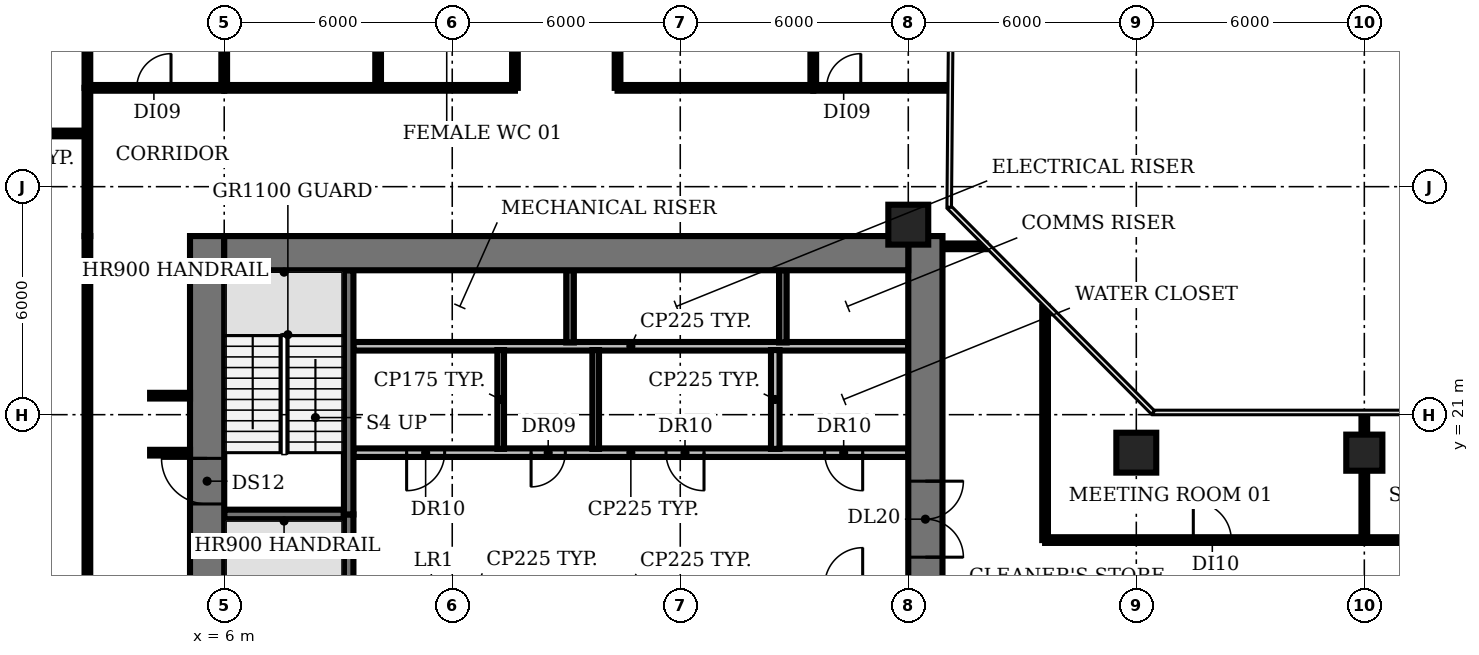
"""IFC4 building model, lengths in metres.
Left out: names, types, materials, properties, quantities, classifications, styles, units other than length and angle.
Written with IfcOpenShell. Run it as: python <this file> out.ifc"""

import sys

from ifc_helpers import new_model, si_unit, direction, frame, frame_2d, origin, origin_2d, place, context, subcontext, project, spatial, rectangle, circle, extrude, element, fill, save


model = new_model("IFC4")
c1 = context("Model", 3, precision=1e-05, world=origin(), true_north=direction((0.0, 1.0)))
c2 = subcontext(c1, "Body", "Model", "MODEL_VIEW")
j1 = project(units=[si_unit("LENGTHUNIT", "METRE"), si_unit("PLANEANGLEUNIT", "RADIAN")], contexts=[c1])
p1 = place(None, origin())
s1 = spatial("IfcSite", under=j1, at=p1, CompositionType="ELEMENT")
p2 = place(p1, origin())
s2 = spatial("IfcBuilding", under=s1, at=p2, CompositionType="ELEMENT")
p3 = place(p2, frame((0.0, 0.0, 50.0)))
s3 = spatial("IfcBuildingStorey", under=s2, at=p3, CompositionType="ELEMENT", Elevation=50.0)
for number, where, z_axis, x_axis in (
    (1, (24.0, 26.0, 0.0), (0.0, 0.0, 1.0), (1.0, 0.0, 0.0)),
    (2, (30.0, 20.0, 0.0), (0.0, 0.0, 1.0), (1.0, 0.0, 0.0)),
):
    element("IfcColumn", number, at=place(p3, frame(where, z_axis=z_axis, x_axis=x_axis)), inside=s3, PredefinedType="COLUMN", context=c2, shape_type="SweptSolid", body=[
        extrude(circle(Radius=0.525, at=origin_2d()), origin(), (0.0, 0.0, 1.0), 3.85),
    ])
p4 = place(p3, frame((36.0, 20.0, 0.0), z_axis=(0.0, 0.0, 1.0), x_axis=(1.0, 0.0, 0.0)))
e3 = element("IfcColumn", 3, at=p4, inside=s3, PredefinedType="COLUMN", context=c2, shape_type="SweptSolid", body=[
    extrude(rectangle(XDim=0.95, YDim=0.95, at=origin_2d()), origin(), (0.0, 0.0, 1.0), 3.85),
])
p5 = place(p3, frame((6.0, 18.375, 0.0), z_axis=(0.0, 0.0, 1.0), x_axis=(1.0, 0.0, 0.0)))
e4 = element("IfcWall", 4, at=p5, inside=s3, PredefinedType="SHEAR", context=c2, shape_type="SweptSolid", body=[
    extrude(rectangle(XDim=3.15, YDim=0.25, at=frame_2d((1.575, 0.0))), origin(), (0.0, 0.0, 1.0), 3.85),
])
p6 = place(p3, frame((24.0, 20.0, 0.0), z_axis=(0.0, 0.0, 1.0), x_axis=(-1.0, 0.0, 0.0)))
e5 = element("IfcWall", 5, at=p6, inside=s3, PredefinedType="PARTITIONING", context=c2, shape_type="SweptSolid", body=[
    extrude(rectangle(XDim=14.6, YDim=0.225, at=frame_2d((7.3, 0.0))), origin(), (0.0, 0.0, 1.0), 3.85),
])
p7 = place(p6, frame((12.2, 0.0, 0.0)))
e6 = element("IfcOpeningElement", 6, at=p7, cuts=e5, PredefinedType="OPENING", context=c2, shape_type="SweptSolid", body=[
    extrude(rectangle(XDim=1.0, YDim=2.1, at=frame_2d((0.5, 1.05))), frame((0.0, 0.123, 0.0), z_axis=(0.0, -1.0, 0.0), x_axis=(1.0, 0.0, 0.0)), (0.0, 0.0, 1.0), 0.245),
])
p8 = place(p6, frame((9.025, 0.0, 0.0)))
e7 = element("IfcOpeningElement", 7, at=p8, cuts=e5, PredefinedType="OPENING", context=c2, shape_type="SweptSolid", body=[
    extrude(rectangle(XDim=0.9, YDim=2.1, at=frame_2d((0.45, 1.05))), frame((0.0, 0.123, 0.0), z_axis=(0.0, -1.0, 0.0), x_axis=(1.0, 0.0, 0.0)), (0.0, 0.0, 1.0), 0.245),
])
p9 = place(p6, frame((5.375, 0.0, 0.0)))
e8 = element("IfcOpeningElement", 8, at=p9, cuts=e5, PredefinedType="OPENING", context=c2, shape_type="SweptSolid", body=[
    extrude(rectangle(XDim=1.0, YDim=2.1, at=frame_2d((0.5, 1.05))), frame((0.0, 0.123, 0.0), z_axis=(0.0, -1.0, 0.0), x_axis=(1.0, 0.0, 0.0)), (0.0, 0.0, 1.0), 0.245),
])
p10 = place(p6, frame((1.2, 0.0, 0.0)))
e9 = element("IfcOpeningElement", 9, at=p10, cuts=e5, PredefinedType="OPENING", context=c2, shape_type="SweptSolid", body=[
    extrude(rectangle(XDim=1.0, YDim=2.1, at=frame_2d((0.5, 1.05))), frame((0.0, 0.123, 0.0), z_axis=(0.0, -1.0, 0.0), x_axis=(1.0, 0.0, 0.0)), (0.0, 0.0, 1.0), 0.245),
])
p11 = place(p3, frame((9.4, 22.8, 0.0), z_axis=(0.0, 0.0, 1.0), x_axis=(1.0, 0.0, 0.0)))
e10 = element("IfcWall", 10, at=p11, inside=s3, PredefinedType="PARTITIONING", context=c2, shape_type="SweptSolid", body=[
    extrude(rectangle(XDim=14.6, YDim=0.225, at=frame_2d((7.3, 0.0))), origin(), (0.0, 0.0, 1.0), 3.85),
])
p12 = place(p3, frame((9.275, 18.375, 0.0), z_axis=(0.0, 0.0, 1.0), x_axis=(0.0, -1.0, 0.0)))
e11 = element("IfcWall", 11, at=p12, inside=s3, PredefinedType="SHEAR", context=c2, shape_type="SweptSolid", body=[
    extrude(rectangle(XDim=6.55, YDim=0.25, at=frame_2d((3.275, 0.0))), origin(), (0.0, 0.0, 1.0), 3.85),
])
p13 = place(p12, frame((5.075, 0.0, 0.0)))
e12 = element("IfcOpeningElement", 12, at=p13, cuts=e11, PredefinedType="OPENING", context=c2, shape_type="SweptSolid", body=[
    extrude(rectangle(XDim=1.0, YDim=2.1, at=frame_2d((0.5, 1.05))), frame((0.0, 0.135, 0.0), z_axis=(0.0, -1.0, 0.0), x_axis=(1.0, 0.0, 0.0)), (0.0, 0.0, 1.0), 0.27),
])
p14 = place(p3, frame((9.275, 18.375, 0.0), z_axis=(0.0, 0.0, 1.0), x_axis=(0.0, 1.0, 0.0)))
e13 = element("IfcWall", 13, at=p14, inside=s3, PredefinedType="SHEAR", context=c2, shape_type="SweptSolid", body=[
    extrude(rectangle(XDim=6.425, YDim=0.25, at=frame_2d((3.212, 0.0))), origin(), (0.0, 0.0, 1.0), 3.85),
])
p15 = place(p3, frame((13.275, 20.1, 0.0), z_axis=(0.0, 0.0, 1.0), x_axis=(0.0, 1.0, 0.0)))
e14 = element("IfcWall", 14, at=p15, inside=s3, PredefinedType="PARTITIONING", context=c2, shape_type="SweptSolid", body=[
    extrude(rectangle(XDim=2.6, YDim=0.175, at=frame_2d((1.3, 0.0))), origin(), (0.0, 0.0, 1.0), 3.85),
])
p16 = place(p3, frame((15.1, 22.9, 0.0), z_axis=(0.0, 0.0, 1.0), x_axis=(0.0, 1.0, 0.0)))
e15 = element("IfcWall", 15, at=p16, inside=s3, PredefinedType="SHEAR", context=c2, shape_type="SweptSolid", body=[
    extrude(rectangle(XDim=1.9, YDim=0.2, at=frame_2d((0.95, 0.0))), origin(), (0.0, 0.0, 1.0), 3.85),
])
p17 = place(p3, frame((15.775, 20.1, 0.0), z_axis=(0.0, 0.0, 1.0), x_axis=(0.0, 1.0, 0.0)))
e16 = element("IfcWall", 16, at=p17, inside=s3, PredefinedType="PARTITIONING", context=c2, shape_type="SweptSolid", body=[
    extrude(rectangle(XDim=2.6, YDim=0.175, at=frame_2d((1.3, 0.0))), origin(), (0.0, 0.0, 1.0), 3.85),
])
p18 = place(p3, frame((20.5, 20.1, 0.0), z_axis=(0.0, 0.0, 1.0), x_axis=(0.0, 1.0, 0.0)))
e17 = element("IfcWall", 17, at=p18, inside=s3, PredefinedType="PARTITIONING", context=c2, shape_type="SweptSolid", body=[
    extrude(rectangle(XDim=2.6, YDim=0.225, at=frame_2d((1.3, 0.0))), origin(), (0.0, 0.0, 1.0), 3.85),
])
p19 = place(p3, frame((20.7, 22.9, 0.0), z_axis=(0.0, 0.0, 1.0), x_axis=(0.0, 1.0, 0.0)))
e18 = element("IfcWall", 18, at=p19, inside=s3, PredefinedType="SHEAR", context=c2, shape_type="SweptSolid", body=[
    extrude(rectangle(XDim=1.9, YDim=0.2, at=frame_2d((0.95, 0.0))), origin(), (0.0, 0.0, 1.0), 3.85),
])
p20 = place(p3, frame((5.55, 4.5, 0.0), z_axis=(0.0, 0.0, 1.0), x_axis=(0.0, 1.0, 0.0)))
e19 = element("IfcWall", 19, at=p20, inside=s3, PredefinedType="SHEAR", context=c2, shape_type="SweptSolid", body=[
    extrude(rectangle(XDim=21.2, YDim=0.9, at=frame_2d((10.6, 0.0))), origin(), (0.0, 0.0, 1.0), 3.85),
])
p21 = place(p20, frame((1.15, 0.0, 0.0)))
e20 = element("IfcOpeningElement", 20, at=p21, cuts=e19, PredefinedType="OPENING", context=c2, shape_type="SweptSolid", body=[
    extrude(rectangle(XDim=1.5, YDim=2.1, at=frame_2d((0.75, 1.05))), frame((0.0, 0.46, 0.0), z_axis=(0.0, -1.0, 0.0), x_axis=(1.0, 0.0, 0.0)), (0.0, 0.0, 1.0), 0.92),
])
p22 = place(p20, frame((7.6, 0.0, 0.0)))
e21 = element("IfcOpeningElement", 21, at=p22, cuts=e19, PredefinedType="OPENING", context=c2, shape_type="SweptSolid", body=[
    extrude(rectangle(XDim=1.2, YDim=2.1, at=frame_2d((0.6, 1.05))), frame((0.0, 0.46, 0.0), z_axis=(0.0, -1.0, 0.0), x_axis=(1.0, 0.0, 0.0)), (0.0, 0.0, 1.0), 0.92),
])
p23 = place(p20, frame((14.15, 0.0, 0.0)))
e22 = element("IfcOpeningElement", 22, at=p23, cuts=e19, PredefinedType="OPENING", context=c2, shape_type="SweptSolid", body=[
    extrude(rectangle(XDim=1.2, YDim=2.1, at=frame_2d((0.6, 1.05))), frame((0.0, 0.46, 0.0), z_axis=(0.0, -1.0, 0.0), x_axis=(1.0, 0.0, 0.0)), (0.0, 0.0, 1.0), 0.92),
])
p24 = place(p3, frame((24.45, 25.7, 0.0), z_axis=(0.0, 0.0, 1.0), x_axis=(0.0, -1.0, 0.0)))
e23 = element("IfcWall", 23, at=p24, inside=s3, PredefinedType="SHEAR", context=c2, shape_type="SweptSolid", body=[
    extrude(rectangle(XDim=21.2, YDim=0.9, at=frame_2d((10.6, 0.0))), origin(), (0.0, 0.0, 1.0), 3.85),
])
p25 = place(p24, frame((18.55, 0.0, 0.0)))
e24 = element("IfcOpeningElement", 24, at=p25, cuts=e23, PredefinedType="OPENING", context=c2, shape_type="SweptSolid", body=[
    extrude(rectangle(XDim=1.5, YDim=2.1, at=frame_2d((0.75, 1.05))), frame((0.0, 0.46, 0.0), z_axis=(0.0, -1.0, 0.0), x_axis=(1.0, 0.0, 0.0)), (0.0, 0.0, 1.0), 0.92),
])
p26 = place(p24, frame((12.45, 0.0, 0.0)))
e25 = element("IfcOpeningElement", 25, at=p26, cuts=e23, PredefinedType="OPENING", context=c2, shape_type="SweptSolid", body=[
    extrude(rectangle(XDim=0.9, YDim=2.1, at=frame_2d((0.45, 1.05))), frame((0.0, 0.46, 0.0), z_axis=(0.0, -1.0, 0.0), x_axis=(1.0, 0.0, 0.0)), (0.0, 0.0, 1.0), 0.92),
])
p27 = place(p24, frame((6.45, 0.0, 0.0)))
e26 = element("IfcOpeningElement", 26, at=p27, cuts=e23, PredefinedType="OPENING", context=c2, shape_type="SweptSolid", body=[
    extrude(rectangle(XDim=2.0, YDim=2.1, at=frame_2d((1.0, 1.05))), frame((0.0, 0.46, 0.0), z_axis=(0.0, -1.0, 0.0), x_axis=(1.0, 0.0, 0.0)), (0.0, 0.0, 1.0), 0.92),
])
p28 = place(p3, frame((6.0, 25.25, 0.0), z_axis=(0.0, 0.0, 1.0), x_axis=(1.0, 0.0, 0.0)))
e27 = element("IfcWall", 27, at=p28, inside=s3, PredefinedType="SHEAR", context=c2, shape_type="SweptSolid", body=[
    extrude(rectangle(XDim=18.0, YDim=0.9, at=frame_2d((9.0, 0.0))), origin(), (0.0, 0.0, 1.0), 3.85),
])
p29 = place(p3, frame((-1.01, 28.4, 0.0), z_axis=(0.0, 0.0, 1.0), x_axis=(1.0, 0.0, 0.0)))
e28 = element("IfcWall", 28, at=p29, inside=s3, PredefinedType="PARTITIONING", context=c2, shape_type="SweptSolid", body=[
    extrude(rectangle(XDim=3.41, YDim=0.15, at=frame_2d((1.705, 0.0))), origin(), (0.0, 0.0, 1.0), 2.83),
])
p30 = place(p3, frame((2.4, 4.5, 0.0), z_axis=(0.0, 0.0, 1.0), x_axis=(0.0, 1.0, 0.0)))
e29 = element("IfcWall", 29, at=p30, inside=s3, PredefinedType="PARTITIONING", context=c2, shape_type="SweptSolid", body=[
    extrude(rectangle(XDim=21.2, YDim=0.15, at=frame_2d((10.6, 0.0))), origin(), (0.0, 0.0, 1.0), 2.83),
])
p31 = place(p30, frame((10.8, 0.0, 0.0)))
e30 = element("IfcOpeningElement", 30, at=p31, cuts=e29, PredefinedType="OPENING", context=c2, shape_type="SweptSolid", body=[
    extrude(rectangle(XDim=1.2, YDim=2.1, at=frame_2d((0.6, 1.05))), frame((0.0, 0.085, 0.0), z_axis=(0.0, -1.0, 0.0), x_axis=(1.0, 0.0, 0.0)), (0.0, 0.0, 1.0), 0.17),
])
p32 = place(p3, frame((2.4, 25.7, 0.0), z_axis=(0.0, 0.0, 1.0), x_axis=(0.0, 1.0, 0.0)))
e31 = element("IfcWall", 31, at=p32, inside=s3, PredefinedType="PARTITIONING", context=c2, shape_type="SweptSolid", body=[
    extrude(rectangle(XDim=3.9, YDim=0.15, at=frame_2d((1.95, 0.0))), origin(), (0.0, 0.0, 1.0), 2.83),
])
p33 = place(p3, frame((2.4, 29.6, 0.0), z_axis=(0.0, 0.0, 1.0), x_axis=(0.0, 1.0, 0.0)))
e32 = element("IfcWall", 32, at=p33, inside=s3, PredefinedType="PARTITIONING", context=c2, shape_type="SweptSolid", body=[
    extrude(rectangle(XDim=4.8, YDim=0.15, at=frame_2d((2.4, 0.0))), origin(), (0.0, 0.0, 1.0), 2.83),
])
p34 = place(p3, frame((2.4, 29.6, 0.0), z_axis=(0.0, 0.0, 1.0), x_axis=(1.0, 0.0, 0.0)))
e33 = element("IfcWall", 33, at=p34, inside=s3, PredefinedType="PARTITIONING", context=c2, shape_type="SweptSolid", body=[
    extrude(rectangle(XDim=3.6, YDim=0.15, at=frame_2d((1.8, 0.0))), origin(), (0.0, 0.0, 1.0), 2.83),
])
p35 = place(p34, frame((1.3, 0.0, 0.0)))
e34 = element("IfcOpeningElement", 34, at=p35, cuts=e33, PredefinedType="OPENING", context=c2, shape_type="SweptSolid", body=[
    extrude(rectangle(XDim=0.9, YDim=2.1, at=frame_2d((0.45, 1.05))), frame((0.0, 0.085, 0.0), z_axis=(0.0, -1.0, 0.0), x_axis=(1.0, 0.0, 0.0)), (0.0, 0.0, 1.0), 0.17),
])
for number, where, z_axis, x_axis in (
    (35, (4.05, 20.0, 0.0), (0.0, 0.0, 1.0), (1.0, 0.0, 0.0)),
    (36, (4.05, 21.5, 0.0), (0.0, 0.0, 1.0), (1.0, 0.0, 0.0)),
):
    element("IfcWall", number, at=place(p3, frame(where, z_axis=z_axis, x_axis=x_axis)), inside=s3, PredefinedType="PARTITIONING", context=c2, shape_type="SweptSolid", body=[
        extrude(rectangle(XDim=1.05, YDim=0.15, at=frame_2d((0.525, 0.0))), origin(), (0.0, 0.0, 1.0), 2.83),
    ])
p36 = place(p3, frame((6.0, 29.6, 0.0), z_axis=(0.0, 0.0, 1.0), x_axis=(0.0, 1.0, 0.0)))
e37 = element("IfcWall", 37, at=p36, inside=s3, PredefinedType="PARTITIONING", context=c2, shape_type="SweptSolid", body=[
    extrude(rectangle(XDim=4.8, YDim=0.15, at=frame_2d((2.4, 0.0))), origin(), (0.0, 0.0, 1.0), 2.83),
])
p37 = place(p3, frame((6.0, 29.6, 0.0), z_axis=(0.0, 0.0, 1.0), x_axis=(1.0, 0.0, 0.0)))
e38 = element("IfcWall", 38, at=p37, inside=s3, PredefinedType="PARTITIONING", context=c2, shape_type="SweptSolid", body=[
    extrude(rectangle(XDim=7.65, YDim=0.15, at=frame_2d((3.825, 0.0))), origin(), (0.0, 0.0, 1.0), 2.83),
])
p38 = place(p3, frame((10.05, 29.6, 0.0), z_axis=(0.0, 0.0, 1.0), x_axis=(0.0, 1.0, 0.0)))
e39 = element("IfcWall", 39, at=p38, inside=s3, PredefinedType="PARTITIONING", context=c2, shape_type="SweptSolid", body=[
    extrude(rectangle(XDim=4.8, YDim=0.15, at=frame_2d((2.4, 0.0))), origin(), (0.0, 0.0, 1.0), 2.83),
])
p39 = place(p3, frame((13.65, 29.6, 0.0), z_axis=(0.0, 0.0, 1.0), x_axis=(0.0, 1.0, 0.0)))
e40 = element("IfcWall", 40, at=p39, inside=s3, PredefinedType="PARTITIONING", context=c2, shape_type="SweptSolid", body=[
    extrude(rectangle(XDim=4.8, YDim=0.15, at=frame_2d((2.4, 0.0))), origin(), (0.0, 0.0, 1.0), 2.83),
])
p40 = place(p39, frame((1.9, 0.0, 0.0)))
e41 = element("IfcOpeningElement", 41, at=p40, cuts=e40, PredefinedType="OPENING", context=c2, shape_type="SweptSolid", body=[
    extrude(rectangle(XDim=0.9, YDim=2.1, at=frame_2d((0.45, 1.05))), frame((0.0, 0.085, 0.0), z_axis=(0.0, -1.0, 0.0), x_axis=(1.0, 0.0, 0.0)), (0.0, 0.0, 1.0), 0.17),
])
p41 = place(p3, frame((16.35, 29.6, 0.0), z_axis=(0.0, 0.0, 1.0), x_axis=(0.0, 1.0, 0.0)))
e42 = element("IfcWall", 42, at=p41, inside=s3, PredefinedType="PARTITIONING", context=c2, shape_type="SweptSolid", body=[
    extrude(rectangle(XDim=4.8, YDim=0.15, at=frame_2d((2.4, 0.0))), origin(), (0.0, 0.0, 1.0), 2.83),
])
p42 = place(p3, frame((16.35, 29.6, 0.0), z_axis=(0.0, 0.0, 1.0), x_axis=(1.0, 0.0, 0.0)))
e43 = element("IfcWall", 43, at=p42, inside=s3, PredefinedType="PARTITIONING", context=c2, shape_type="SweptSolid", body=[
    extrude(rectangle(XDim=5.15, YDim=0.15, at=frame_2d((2.575, 0.0))), origin(), (0.0, 0.0, 1.0), 2.83),
])
p43 = place(p3, frame((21.5, 29.6, 0.0), z_axis=(0.0, 0.0, 1.0), x_axis=(0.0, 1.0, 0.0)))
e44 = element("IfcWall", 44, at=p43, inside=s3, PredefinedType="PARTITIONING", context=c2, shape_type="SweptSolid", body=[
    extrude(rectangle(XDim=4.8, YDim=0.15, at=frame_2d((2.4, 0.0))), origin(), (0.0, 0.0, 1.0), 2.83),
])
p44 = place(p3, frame((21.5, 29.6, 0.0), z_axis=(0.0, 0.0, 1.0), x_axis=(1.0, 0.0, 0.0)))
e45 = element("IfcWall", 45, at=p44, inside=s3, PredefinedType="PARTITIONING", context=c2, shape_type="SweptSolid", body=[
    extrude(rectangle(XDim=3.55, YDim=0.15, at=frame_2d((1.775, 0.0))), origin(), (0.0, 0.0, 1.0), 2.83),
])
p45 = place(p44, frame((0.35, 0.0, 0.0)))
e46 = element("IfcOpeningElement", 46, at=p45, cuts=e45, PredefinedType="OPENING", context=c2, shape_type="SweptSolid", body=[
    extrude(rectangle(XDim=0.9, YDim=2.1, at=frame_2d((0.45, 1.05))), frame((0.0, 0.085, 0.0), z_axis=(0.0, -1.0, 0.0), x_axis=(1.0, 0.0, 0.0)), (0.0, 0.0, 1.0), 0.17),
])
p46 = place(p3, frame((25.0, 25.43, 0.0), z_axis=(0.0, 0.0, 1.0), x_axis=(1.0, 0.0, 0.0)))
e47 = element("IfcWall", 47, at=p46, inside=s3, PredefinedType="PARTITIONING", context=c2, shape_type="SweptSolid", body=[
    extrude(rectangle(XDim=1.03, YDim=0.15, at=frame_2d((0.515, 0.0))), origin(), (0.0, 0.0, 1.0), 2.83),
])
p47 = place(p3, frame((27.6, 17.7, 0.0), z_axis=(0.0, 0.0, 1.0), x_axis=(0.0, 1.0, 0.0)))
e48 = element("IfcWall", 48, at=p47, inside=s3, PredefinedType="PARTITIONING", context=c2, shape_type="SweptSolid", body=[
    extrude(rectangle(XDim=6.14, YDim=0.15, at=frame_2d((3.07, 0.0))), origin(), (0.0, 0.0, 1.0), 2.83),
])
p48 = place(p3, frame((27.6, 17.7, 0.0), z_axis=(0.0, 0.0, 1.0), x_axis=(1.0, 0.0, 0.0)))
e49 = element("IfcWall", 49, at=p48, inside=s3, PredefinedType="PARTITIONING", context=c2, shape_type="SweptSolid", body=[
    extrude(rectangle(XDim=8.4, YDim=0.15, at=frame_2d((4.2, 0.0))), origin(), (0.0, 0.0, 1.0), 2.83),
])
p49 = place(p48, frame((3.9, 0.0, 0.0)))
e50 = element("IfcOpeningElement", 50, at=p49, cuts=e49, PredefinedType="OPENING", context=c2, shape_type="SweptSolid", body=[
    extrude(rectangle(XDim=1.0, YDim=2.1, at=frame_2d((0.5, 1.05))), frame((0.0, 0.085, 0.0), z_axis=(0.0, -1.0, 0.0), x_axis=(1.0, 0.0, 0.0)), (0.0, 0.0, 1.0), 0.17),
])
p50 = place(p3, frame((36.0, 17.7, 0.0), z_axis=(0.0, 0.0, 1.0), x_axis=(0.0, 1.0, 0.0)))
e51 = element("IfcWall", 51, at=p50, inside=s3, PredefinedType="PARTITIONING", context=c2, shape_type="SweptSolid", body=[
    extrude(rectangle(XDim=3.31, YDim=0.15, at=frame_2d((1.655, 0.0))), origin(), (0.0, 0.0, 1.0), 2.83),
])
p51 = place(p3, frame((36.0, 17.7, 0.0), z_axis=(0.0, 0.0, 1.0), x_axis=(1.0, 0.0, 0.0)))
e52 = element("IfcWall", 52, at=p51, inside=s3, PredefinedType="PARTITIONING", context=c2, shape_type="SweptSolid", body=[
    extrude(rectangle(XDim=6.0, YDim=0.15, at=frame_2d((3.0, 0.0))), origin(), (0.0, 0.0, 1.0), 2.83),
])
p52 = place(p51, frame((2.4, 0.0, 0.0)))
e53 = element("IfcOpeningElement", 53, at=p52, cuts=e52, PredefinedType="OPENING", context=c2, shape_type="SweptSolid", body=[
    extrude(rectangle(XDim=1.0, YDim=2.1, at=frame_2d((0.5, 1.05))), frame((0.0, 0.085, 0.0), z_axis=(0.0, -1.0, 0.0), x_axis=(1.0, 0.0, 0.0)), (0.0, 0.0, 1.0), 0.17),
])
p53 = place(p7, origin())
e54 = element("IfcDoor", 54, at=p53, inside=s3, OperationType="SINGLE_SWING_RIGHT", PredefinedType="DOOR", context=c2, shape_type="SweptSolid", body=[
    extrude(rectangle(XDim=1.0, YDim=2.1, at=frame_2d((0.5, 1.05))), frame((0.0, 0.025, 0.0), z_axis=(0.0, -1.0, 0.0), x_axis=(1.0, 0.0, 0.0)), (0.0, 0.0, 1.0), 0.05),
])
fill(e6, e54)
p54 = place(p8, origin())
e55 = element("IfcDoor", 55, at=p54, inside=s3, OperationType="SINGLE_SWING_RIGHT", PredefinedType="DOOR", context=c2, shape_type="SweptSolid", body=[
    extrude(rectangle(XDim=0.9, YDim=2.1, at=frame_2d((0.45, 1.05))), frame((0.0, 0.025, 0.0), z_axis=(0.0, -1.0, 0.0), x_axis=(1.0, 0.0, 0.0)), (0.0, 0.0, 1.0), 0.05),
])
fill(e7, e55)
p55 = place(p9, origin())
e56 = element("IfcDoor", 56, at=p55, inside=s3, OperationType="SINGLE_SWING_LEFT", PredefinedType="DOOR", context=c2, shape_type="SweptSolid", body=[
    extrude(rectangle(XDim=1.0, YDim=2.1, at=frame_2d((0.5, 1.05))), frame((0.0, 0.025, 0.0), z_axis=(0.0, -1.0, 0.0), x_axis=(1.0, 0.0, 0.0)), (0.0, 0.0, 1.0), 0.05),
])
fill(e8, e56)
p56 = place(p10, origin())
e57 = element("IfcDoor", 57, at=p56, inside=s3, OperationType="SINGLE_SWING_LEFT", PredefinedType="DOOR", context=c2, shape_type="SweptSolid", body=[
    extrude(rectangle(XDim=1.0, YDim=2.1, at=frame_2d((0.5, 1.05))), frame((0.0, 0.025, 0.0), z_axis=(0.0, -1.0, 0.0), x_axis=(1.0, 0.0, 0.0)), (0.0, 0.0, 1.0), 0.05),
])
fill(e9, e57)
p57 = place(p23, origin())
e58 = element("IfcDoor", 58, at=p57, inside=s3, OperationType="SINGLE_SWING_RIGHT", PredefinedType="DOOR", context=c2, shape_type="SweptSolid", body=[
    extrude(rectangle(XDim=1.2, YDim=2.1, at=frame_2d((0.6, 1.05))), frame((0.0, 0.025, 0.0), z_axis=(0.0, -1.0, 0.0), x_axis=(1.0, 0.0, 0.0)), (0.0, 0.0, 1.0), 0.05),
])
fill(e22, e58)
p58 = place(p27, origin())
e59 = element("IfcDoor", 59, at=p58, inside=s3, OperationType="DOUBLE_DOOR_SINGLE_SWING", PredefinedType="DOOR", context=c2, shape_type="SweptSolid", body=[
    extrude(rectangle(XDim=2.0, YDim=2.1, at=frame_2d((1.0, 1.05))), frame((0.0, 0.025, 0.0), z_axis=(0.0, -1.0, 0.0), x_axis=(1.0, 0.0, 0.0)), (0.0, 0.0, 1.0), 0.05),
])
fill(e26, e59)
p59 = place(p35, origin())
e60 = element("IfcDoor", 60, at=p59, inside=s3, OperationType="SINGLE_SWING_RIGHT", PredefinedType="DOOR", context=c2, shape_type="SweptSolid", body=[
    extrude(rectangle(XDim=0.9, YDim=2.1, at=frame_2d((0.45, 1.05))), frame((0.0, 0.025, 0.0), z_axis=(0.0, -1.0, 0.0), x_axis=(1.0, 0.0, 0.0)), (0.0, 0.0, 1.0), 0.05),
])
fill(e34, e60)
p60 = place(p45, origin())
e61 = element("IfcDoor", 61, at=p60, inside=s3, OperationType="SINGLE_SWING_RIGHT", PredefinedType="DOOR", context=c2, shape_type="SweptSolid", body=[
    extrude(rectangle(XDim=0.9, YDim=2.1, at=frame_2d((0.45, 1.05))), frame((0.0, 0.025, 0.0), z_axis=(0.0, -1.0, 0.0), x_axis=(1.0, 0.0, 0.0)), (0.0, 0.0, 1.0), 0.05),
])
fill(e46, e61)
p61 = place(p49, origin())
e62 = element("IfcDoor", 62, at=p61, inside=s3, OperationType="SINGLE_SWING_LEFT", PredefinedType="DOOR", context=c2, shape_type="SweptSolid", body=[
    extrude(rectangle(XDim=1.0, YDim=2.1, at=frame_2d((0.5, 1.05))), frame((0.0, 0.025, 0.0), z_axis=(0.0, -1.0, 0.0), x_axis=(1.0, 0.0, 0.0)), (0.0, 0.0, 1.0), 0.05),
])
fill(e50, e62)
save(model, sys.argv[1])
